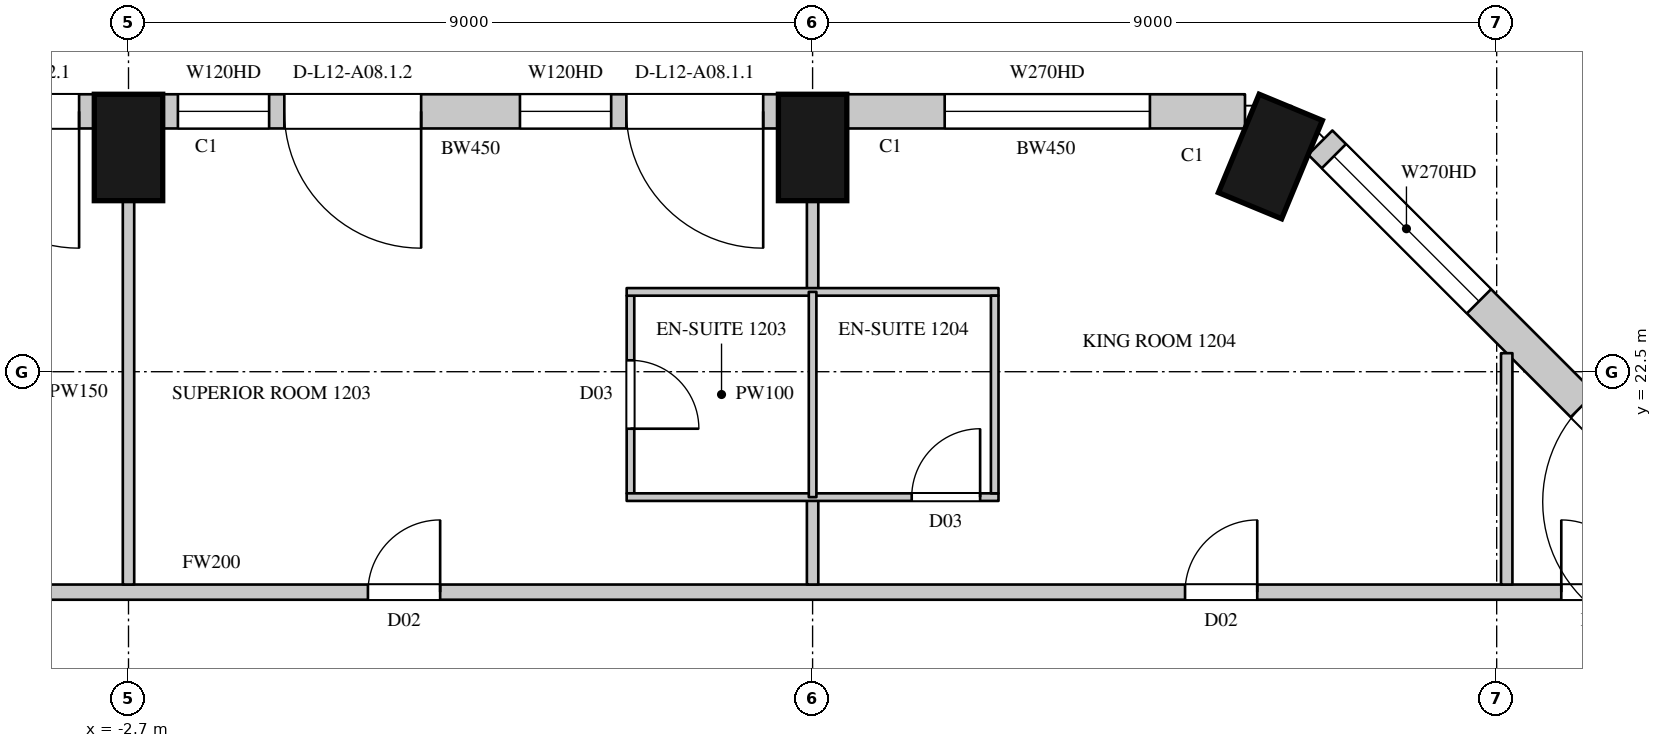
"""IFC4 building model, lengths in metres.
Left out: names, types, materials, properties, quantities, classifications, styles, units other than length and angle.
Written with IfcOpenShell. Run it as: python <this file> out.ifc"""

import sys

from ifc_helpers import new_model, si_unit, direction, frame, frame_2d, origin, origin_2d, place, context, subcontext, project, spatial, rectangle, extrude, element, fill, save


model = new_model("IFC4")
c1 = context("Model", 3, precision=1e-05, world=origin(), true_north=direction((0.0, 1.0)))
c2 = subcontext(c1, "Body", "Model", "MODEL_VIEW")
j1 = project(units=[si_unit("LENGTHUNIT", "METRE"), si_unit("PLANEANGLEUNIT", "RADIAN")], contexts=[c1])
p1 = place(None, origin())
s1 = spatial("IfcSite", under=j1, at=p1, CompositionType="ELEMENT")
p2 = place(p1, origin())
s2 = spatial("IfcBuilding", under=s1, at=p2, CompositionType="ELEMENT")
p3 = place(p2, frame((0.0, 0.0, 73.5)))
s3 = spatial("IfcBuildingStorey", under=s2, at=p3, CompositionType="ELEMENT", Elevation=73.5)
for number, where, z_axis, x_axis in (
    (1, (12.323, 25.331, 0.0), (0.0, 0.0, 1.0), (-0.924, 0.383, 0.0)),
    (2, (6.3, 25.45, 0.0), (0.0, 0.0, 1.0), (-1.0, 0.0, 0.0)),
    (3, (-2.7, 25.45, 0.0), (0.0, 0.0, 1.0), (-1.0, 0.0, 0.0)),
):
    element("IfcColumn", number, at=place(p3, frame(where, z_axis=z_axis, x_axis=x_axis)), inside=s3, PredefinedType="COLUMN", context=c2, shape_type="SweptSolid", body=[
        extrude(rectangle(XDim=0.9, YDim=1.4, at=origin_2d()), origin(), (0.0, 0.0, 1.0), 3.6),
    ])
p4 = place(p3, frame((18.229, 20.265, 0.0), z_axis=(0.0, 0.0, 1.0), x_axis=(-0.707106781187, 0.707106781187, 0.0)))
e4 = element("IfcWall", 4, at=p4, inside=s3, PredefinedType="SOLIDWALL", context=c2, shape_type="SweptSolid", body=[
    extrude(rectangle(XDim=7.424, YDim=0.45, at=frame_2d((3.712, 0.0))), origin(), (0.0, 0.0, 1.0), 3.3),
])
p5 = place(p4, frame((0.74, 0.0, 0.0)))
e5 = element("IfcOpeningElement", 5, at=p5, cuts=e4, PredefinedType="OPENING", context=c2, shape_type="SweptSolid", body=[
    extrude(rectangle(XDim=1.8, YDim=2.4, at=frame_2d((0.9, 1.2))), frame((0.0, 0.235, 0.0), z_axis=(0.0, -1.0, 0.0), x_axis=(1.0, 0.0, 0.0)), (0.0, 0.0, 1.0), 0.47),
])
p6 = place(p4, frame((4.471, 0.0, 1.05)))
e6 = element("IfcOpeningElement", 6, at=p6, cuts=e4, PredefinedType="OPENING", context=c2, shape_type="SweptSolid", body=[
    extrude(rectangle(XDim=2.7, YDim=2.0, at=frame_2d((1.35, 1.0))), frame((0.0, 0.235, 0.0), z_axis=(0.0, -1.0, 0.0), x_axis=(1.0, 0.0, 0.0)), (0.0, 0.0, 1.0), 0.47),
])
p7 = place(p3, frame((11.989, 25.925, 0.0), z_axis=(0.0, 0.0, 1.0), x_axis=(-1.0, 0.0, 0.0)))
e7 = element("IfcWall", 7, at=p7, inside=s3, PredefinedType="SOLIDWALL", context=c2, shape_type="SweptSolid", body=[
    extrude(rectangle(XDim=5.239, YDim=0.45, at=frame_2d((2.619, 0.0))), origin(), (0.0, 0.0, 1.0), 3.3),
])
p8 = place(p7, frame((1.251, 0.0, 1.05)))
e8 = element("IfcOpeningElement", 8, at=p8, cuts=e7, PredefinedType="OPENING", context=c2, shape_type="SweptSolid", body=[
    extrude(rectangle(XDim=2.7, YDim=2.0, at=frame_2d((1.35, 1.0))), frame((0.0, 0.235, 0.0), z_axis=(0.0, -1.0, 0.0), x_axis=(1.0, 0.0, 0.0)), (0.0, 0.0, 1.0), 0.47),
])
p9 = place(p3, frame((5.85, 25.925, 0.0), z_axis=(0.0, 0.0, 1.0), x_axis=(-1.0, 0.0, 0.0)))
e9 = element("IfcWall", 9, at=p9, inside=s3, PredefinedType="SOLIDWALL", context=c2, shape_type="SweptSolid", body=[
    extrude(rectangle(XDim=8.1, YDim=0.45, at=frame_2d((4.05, 0.0))), origin(), (0.0, 0.0, 1.0), 3.3),
])
p10 = place(p9, frame((0.2, 0.0, 0.0)))
e10 = element("IfcOpeningElement", 10, at=p10, cuts=e9, PredefinedType="OPENING", context=c2, shape_type="SweptSolid", body=[
    extrude(rectangle(XDim=1.8, YDim=2.4, at=frame_2d((0.9, 1.2))), frame((0.0, 0.235, 0.0), z_axis=(0.0, -1.0, 0.0), x_axis=(1.0, 0.0, 0.0)), (0.0, 0.0, 1.0), 0.47),
])
p11 = place(p9, frame((2.2, 0.0, 1.05)))
e11 = element("IfcOpeningElement", 11, at=p11, cuts=e9, PredefinedType="OPENING", context=c2, shape_type="SweptSolid", body=[
    extrude(rectangle(XDim=1.2, YDim=2.0, at=frame_2d((0.6, 1.0))), frame((0.0, 0.235, 0.0), z_axis=(0.0, -1.0, 0.0), x_axis=(1.0, 0.0, 0.0)), (0.0, 0.0, 1.0), 0.47),
])
p12 = place(p9, frame((4.7, 0.0, 0.0)))
e12 = element("IfcOpeningElement", 12, at=p12, cuts=e9, PredefinedType="OPENING", context=c2, shape_type="SweptSolid", body=[
    extrude(rectangle(XDim=1.8, YDim=2.4, at=frame_2d((0.9, 1.2))), frame((0.0, 0.235, 0.0), z_axis=(0.0, -1.0, 0.0), x_axis=(1.0, 0.0, 0.0)), (0.0, 0.0, 1.0), 0.47),
])
p13 = place(p9, frame((6.7, 0.0, 1.05)))
e13 = element("IfcOpeningElement", 13, at=p13, cuts=e9, PredefinedType="OPENING", context=c2, shape_type="SweptSolid", body=[
    extrude(rectangle(XDim=1.2, YDim=2.0, at=frame_2d((0.6, 1.0))), frame((0.0, 0.235, 0.0), z_axis=(0.0, -1.0, 0.0), x_axis=(1.0, 0.0, 0.0)), (0.0, 0.0, 1.0), 0.47),
])
p14 = place(p3, frame((-3.15, 25.925, 0.0), z_axis=(0.0, 0.0, 1.0), x_axis=(-1.0, 0.0, 0.0)))
e14 = element("IfcWall", 14, at=p14, inside=s3, PredefinedType="SOLIDWALL", context=c2, shape_type="SweptSolid", body=[
    extrude(rectangle(XDim=8.1, YDim=0.45, at=frame_2d((4.05, 0.0))), origin(), (0.0, 0.0, 1.0), 3.3),
])
p15 = place(p14, frame((0.2, 0.0, 0.0)))
e15 = element("IfcOpeningElement", 15, at=p15, cuts=e14, PredefinedType="OPENING", context=c2, shape_type="SweptSolid", body=[
    extrude(rectangle(XDim=1.8, YDim=2.4, at=frame_2d((0.9, 1.2))), frame((0.0, 0.235, 0.0), z_axis=(0.0, -1.0, 0.0), x_axis=(1.0, 0.0, 0.0)), (0.0, 0.0, 1.0), 0.47),
])
p16 = place(p14, frame((2.2, 0.0, 1.05)))
e16 = element("IfcOpeningElement", 16, at=p16, cuts=e14, PredefinedType="OPENING", context=c2, shape_type="SweptSolid", body=[
    extrude(rectangle(XDim=1.2, YDim=2.0, at=frame_2d((0.6, 1.0))), frame((0.0, 0.235, 0.0), z_axis=(0.0, -1.0, 0.0), x_axis=(1.0, 0.0, 0.0)), (0.0, 0.0, 1.0), 0.47),
])
p17 = place(p14, frame((4.7, 0.0, 0.0)))
e17 = element("IfcOpeningElement", 17, at=p17, cuts=e14, PredefinedType="OPENING", context=c2, shape_type="SweptSolid", body=[
    extrude(rectangle(XDim=1.8, YDim=2.4, at=frame_2d((0.9, 1.2))), frame((0.0, 0.235, 0.0), z_axis=(0.0, -1.0, 0.0), x_axis=(1.0, 0.0, 0.0)), (0.0, 0.0, 1.0), 0.47),
])
p18 = place(p14, frame((6.7, 0.0, 1.05)))
e18 = element("IfcOpeningElement", 18, at=p18, cuts=e14, PredefinedType="OPENING", context=c2, shape_type="SweptSolid", body=[
    extrude(rectangle(XDim=1.2, YDim=2.0, at=frame_2d((0.6, 1.0))), frame((0.0, 0.235, 0.0), z_axis=(0.0, -1.0, 0.0), x_axis=(1.0, 0.0, 0.0)), (0.0, 0.0, 1.0), 0.47),
])
p19 = place(p3, frame((16.486, 23.529, 0.0), z_axis=(0.0, 0.0, 1.0), x_axis=(-0.707022305137, 0.707191247145, 0.0)))
e19 = element("IfcWall", 19, at=p19, inside=s3, PredefinedType="SOLIDWALL", context=c2, shape_type="SweptSolid", body=[
    extrude(rectangle(XDim=1.445, YDim=0.45, at=frame_2d((0.723, 0.0))), origin(), (0.0, 0.0, 1.0), 0.6),
])
p20 = place(p3, frame((-20.7, 19.6, 0.0), z_axis=(0.0, 0.0, 1.0), x_axis=(1.0, 0.0, 0.0)))
e20 = element("IfcWall", 20, at=p20, inside=s3, PredefinedType="PARTITIONING", context=c2, shape_type="SweptSolid", body=[
    extrude(rectangle(XDim=38.184, YDim=0.2, at=frame_2d((19.092, 0.0))), origin(), (0.0, 0.0, 1.0), 3.3),
])
p21 = place(p20, frame((3.15, 0.0, 0.0)))
e21 = element("IfcOpeningElement", 21, at=p21, cuts=e20, PredefinedType="OPENING", context=c2, shape_type="SweptSolid", body=[
    extrude(rectangle(XDim=0.95, YDim=2.2, at=frame_2d((0.475, 1.1))), frame((0.0, 0.11, 0.0), z_axis=(0.0, -1.0, 0.0), x_axis=(1.0, 0.0, 0.0)), (0.0, 0.0, 1.0), 0.22),
])
p22 = place(p20, frame((13.9, 0.0, 0.0)))
e22 = element("IfcOpeningElement", 22, at=p22, cuts=e20, PredefinedType="OPENING", context=c2, shape_type="SweptSolid", body=[
    extrude(rectangle(XDim=0.95, YDim=2.2, at=frame_2d((0.475, 1.1))), frame((0.0, 0.11, 0.0), z_axis=(0.0, -1.0, 0.0), x_axis=(1.0, 0.0, 0.0)), (0.0, 0.0, 1.0), 0.22),
])
p23 = place(p20, frame((21.15, 0.0, 0.0)))
e23 = element("IfcOpeningElement", 23, at=p23, cuts=e20, PredefinedType="OPENING", context=c2, shape_type="SweptSolid", body=[
    extrude(rectangle(XDim=0.95, YDim=2.2, at=frame_2d((0.475, 1.1))), frame((0.0, 0.11, 0.0), z_axis=(0.0, -1.0, 0.0), x_axis=(1.0, 0.0, 0.0)), (0.0, 0.0, 1.0), 0.22),
])
p24 = place(p20, frame((31.9, 0.0, 0.0)))
e24 = element("IfcOpeningElement", 24, at=p24, cuts=e20, PredefinedType="OPENING", context=c2, shape_type="SweptSolid", body=[
    extrude(rectangle(XDim=0.95, YDim=2.2, at=frame_2d((0.475, 1.1))), frame((0.0, 0.11, 0.0), z_axis=(0.0, -1.0, 0.0), x_axis=(1.0, 0.0, 0.0)), (0.0, 0.0, 1.0), 0.22),
])
p25 = place(p20, frame((36.85, 0.0, 0.0)))
e25 = element("IfcOpeningElement", 25, at=p25, cuts=e20, PredefinedType="OPENING", context=c2, shape_type="SweptSolid", body=[
    extrude(rectangle(XDim=0.95, YDim=2.2, at=frame_2d((0.475, 1.1))), frame((0.0, 0.11, 0.0), z_axis=(0.0, -1.0, 0.0), x_axis=(1.0, 0.0, 0.0)), (0.0, 0.0, 1.0), 0.22),
])
p26 = place(p3, frame((-2.7, 19.7, 0.0), z_axis=(0.0, 0.0, 1.0), x_axis=(0.0, 1.0, 0.0)))
e26 = element("IfcWall", 26, at=p26, inside=s3, PredefinedType="PARTITIONING", context=c2, shape_type="SweptSolid", body=[
    extrude(rectangle(XDim=5.05, YDim=0.15, at=frame_2d((2.525, 0.0))), origin(), (0.0, 0.0, 1.0), 2.75),
])
p27 = place(p3, frame((6.3, 19.7, 0.0), z_axis=(0.0, 0.0, 1.0), x_axis=(0.0, 1.0, 0.0)))
e27 = element("IfcWall", 27, at=p27, inside=s3, PredefinedType="PARTITIONING", context=c2, shape_type="SweptSolid", body=[
    extrude(rectangle(XDim=1.15, YDim=0.15, at=frame_2d((0.575, 0.0))), origin(), (0.0, 0.0, 1.0), 2.75),
])
p28 = place(p3, frame((6.3, 23.55, 0.0), z_axis=(0.0, 0.0, 1.0), x_axis=(0.0, 1.0, 0.0)))
e28 = element("IfcWall", 28, at=p28, inside=s3, PredefinedType="PARTITIONING", context=c2, shape_type="SweptSolid", body=[
    extrude(rectangle(XDim=1.2, YDim=0.15, at=frame_2d((0.6, 0.0))), origin(), (0.0, 0.0, 1.0), 2.75),
])
p29 = place(p3, frame((15.432, 19.7, 0.0), z_axis=(0.0, 0.0, 1.0), x_axis=(0.0, 1.0, 0.0)))
e29 = element("IfcWall", 29, at=p29, inside=s3, PredefinedType="PARTITIONING", context=c2, shape_type="SweptSolid", body=[
    extrude(rectangle(XDim=3.044, YDim=0.15, at=frame_2d((1.522, 0.0))), origin(), (0.0, 0.0, 1.0), 3.3),
])
p30 = place(p3, frame((3.904, 20.9, 0.0), z_axis=(0.0, 0.0, 1.0), x_axis=(0.0, 1.0, 0.0)))
e30 = element("IfcWall", 30, at=p30, inside=s3, PredefinedType="PARTITIONING", context=c2, shape_type="SweptSolid", body=[
    extrude(rectangle(XDim=2.6, YDim=0.1, at=frame_2d((1.3, 0.0))), origin(), (0.0, 0.0, 1.0), 3.3),
])
p31 = place(p30, frame((0.85, 0.0, 0.0)))
e31 = element("IfcOpeningElement", 31, at=p31, cuts=e30, PredefinedType="OPENING", context=c2, shape_type="SweptSolid", body=[
    extrude(rectangle(XDim=0.9, YDim=2.2, at=frame_2d((0.45, 1.1))), frame((0.0, 0.06, 0.0), z_axis=(0.0, -1.0, 0.0), x_axis=(1.0, 0.0, 0.0)), (0.0, 0.0, 1.0), 0.12),
])
p32 = place(p3, frame((3.854, 20.85, 0.0), z_axis=(0.0, 0.0, 1.0), x_axis=(1.0, 0.0, 0.0)))
e32 = element("IfcWall", 32, at=p32, inside=s3, PredefinedType="PARTITIONING", context=c2, shape_type="SweptSolid", body=[
    extrude(rectangle(XDim=4.892, YDim=0.1, at=frame_2d((2.446, 0.0))), origin(), (0.0, 0.0, 1.0), 3.3),
])
p33 = place(p32, frame((3.75, 0.0, 0.0)))
e33 = element("IfcOpeningElement", 33, at=p33, cuts=e32, PredefinedType="OPENING", context=c2, shape_type="SweptSolid", body=[
    extrude(rectangle(XDim=0.9, YDim=2.2, at=frame_2d((0.45, 1.1))), frame((0.0, 0.06, 0.0), z_axis=(0.0, -1.0, 0.0), x_axis=(1.0, 0.0, 0.0)), (0.0, 0.0, 1.0), 0.12),
])
p34 = place(p3, frame((3.854, 23.55, 0.0), z_axis=(0.0, 0.0, 1.0), x_axis=(1.0, 0.0, 0.0)))
e34 = element("IfcWall", 34, at=p34, inside=s3, PredefinedType="PARTITIONING", context=c2, shape_type="SweptSolid", body=[
    extrude(rectangle(XDim=4.892, YDim=0.1, at=frame_2d((2.446, 0.0))), origin(), (0.0, 0.0, 1.0), 3.3),
])
p35 = place(p3, frame((6.3, 20.85, 0.0), z_axis=(0.0, 0.0, 1.0), x_axis=(0.0, 1.0, 0.0)))
e35 = element("IfcWall", 35, at=p35, inside=s3, PredefinedType="PARTITIONING", context=c2, shape_type="SweptSolid", body=[
    extrude(rectangle(XDim=2.7, YDim=0.1, at=frame_2d((1.35, 0.0))), origin(), (0.0, 0.0, 1.0), 2.75),
])
p36 = place(p3, frame((8.696, 20.9, 0.0), z_axis=(0.0, 0.0, 1.0), x_axis=(0.0, 1.0, 0.0)))
e36 = element("IfcWall", 36, at=p36, inside=s3, PredefinedType="PARTITIONING", context=c2, shape_type="SweptSolid", body=[
    extrude(rectangle(XDim=2.6, YDim=0.1, at=frame_2d((1.3, 0.0))), origin(), (0.0, 0.0, 1.0), 3.3),
])
p37 = place(p5, origin())
e37 = element("IfcDoor", 37, at=p37, inside=s3, OperationType="SLIDING_TO_LEFT", PredefinedType="DOOR", context=c2, shape_type="SweptSolid", body=[
    extrude(rectangle(XDim=1.8, YDim=2.4, at=frame_2d((0.9, 1.2))), frame((0.0, 0.13, 0.0), z_axis=(0.0, -1.0, 0.0), x_axis=(1.0, 0.0, 0.0)), (0.0, 0.0, 1.0), 0.05),
])
fill(e5, e37)
p38 = place(p6, origin())
e38 = element("IfcWindow", 38, at=p38, inside=s3, PartitioningType="SINGLE_PANEL", PredefinedType="WINDOW", context=c2, shape_type="SweptSolid", body=[
    extrude(rectangle(XDim=2.7, YDim=2.0, at=frame_2d((1.35, 1.0))), frame((0.0, 0.135, 0.0), z_axis=(0.0, -1.0, 0.0), x_axis=(1.0, 0.0, 0.0)), (0.0, 0.0, 1.0), 0.06),
])
fill(e6, e38)
p39 = place(p8, origin())
e39 = element("IfcWindow", 39, at=p39, inside=s3, PartitioningType="SINGLE_PANEL", PredefinedType="WINDOW", context=c2, shape_type="SweptSolid", body=[
    extrude(rectangle(XDim=2.7, YDim=2.0, at=frame_2d((1.35, 1.0))), frame((0.0, 0.135, 0.0), z_axis=(0.0, -1.0, 0.0), x_axis=(1.0, 0.0, 0.0)), (0.0, 0.0, 1.0), 0.06),
])
fill(e8, e39)
p40 = place(p10, origin())
e40 = element("IfcDoor", 40, at=p40, inside=s3, OperationType="SLIDING_TO_LEFT", PredefinedType="DOOR", context=c2, shape_type="SweptSolid", body=[
    extrude(rectangle(XDim=1.8, YDim=2.4, at=frame_2d((0.9, 1.2))), frame((0.0, 0.13, 0.0), z_axis=(0.0, -1.0, 0.0), x_axis=(1.0, 0.0, 0.0)), (0.0, 0.0, 1.0), 0.05),
])
fill(e10, e40)
p41 = place(p11, origin())
e41 = element("IfcWindow", 41, at=p41, inside=s3, PartitioningType="SINGLE_PANEL", PredefinedType="WINDOW", context=c2, shape_type="SweptSolid", body=[
    extrude(rectangle(XDim=1.2, YDim=2.0, at=frame_2d((0.6, 1.0))), frame((0.0, 0.135, 0.0), z_axis=(0.0, -1.0, 0.0), x_axis=(1.0, 0.0, 0.0)), (0.0, 0.0, 1.0), 0.06),
])
fill(e11, e41)
p42 = place(p12, origin())
e42 = element("IfcDoor", 42, at=p42, inside=s3, OperationType="SLIDING_TO_LEFT", PredefinedType="DOOR", context=c2, shape_type="SweptSolid", body=[
    extrude(rectangle(XDim=1.8, YDim=2.4, at=frame_2d((0.9, 1.2))), frame((0.0, 0.13, 0.0), z_axis=(0.0, -1.0, 0.0), x_axis=(1.0, 0.0, 0.0)), (0.0, 0.0, 1.0), 0.05),
])
fill(e12, e42)
p43 = place(p13, origin())
e43 = element("IfcWindow", 43, at=p43, inside=s3, PartitioningType="SINGLE_PANEL", PredefinedType="WINDOW", context=c2, shape_type="SweptSolid", body=[
    extrude(rectangle(XDim=1.2, YDim=2.0, at=frame_2d((0.6, 1.0))), frame((0.0, 0.135, 0.0), z_axis=(0.0, -1.0, 0.0), x_axis=(1.0, 0.0, 0.0)), (0.0, 0.0, 1.0), 0.06),
])
fill(e13, e43)
p44 = place(p15, origin())
e44 = element("IfcDoor", 44, at=p44, inside=s3, OperationType="SLIDING_TO_LEFT", PredefinedType="DOOR", context=c2, shape_type="SweptSolid", body=[
    extrude(rectangle(XDim=1.8, YDim=2.4, at=frame_2d((0.9, 1.2))), frame((0.0, 0.13, 0.0), z_axis=(0.0, -1.0, 0.0), x_axis=(1.0, 0.0, 0.0)), (0.0, 0.0, 1.0), 0.05),
])
fill(e15, e44)
p45 = place(p23, origin())
e45 = element("IfcDoor", 45, at=p45, inside=s3, OperationType="SINGLE_SWING_RIGHT", PredefinedType="DOOR", context=c2, shape_type="SweptSolid", body=[
    extrude(rectangle(XDim=0.95, YDim=2.2, at=frame_2d((0.475, 1.1))), frame((0.0, 0.025, 0.0), z_axis=(0.0, -1.0, 0.0), x_axis=(1.0, 0.0, 0.0)), (0.0, 0.0, 1.0), 0.05),
])
fill(e23, e45)
p46 = place(p31, origin())
e46 = element("IfcDoor", 46, at=p46, inside=s3, OperationType="SINGLE_SWING_RIGHT", PredefinedType="DOOR", context=c2, shape_type="SweptSolid", body=[
    extrude(rectangle(XDim=0.9, YDim=2.2, at=frame_2d((0.45, 1.1))), frame((0.0, 0.025, 0.0), z_axis=(0.0, -1.0, 0.0), x_axis=(1.0, 0.0, 0.0)), (0.0, 0.0, 1.0), 0.05),
])
fill(e31, e46)
p47 = place(p24, origin())
e47 = element("IfcDoor", 47, at=p47, inside=s3, OperationType="SINGLE_SWING_RIGHT", PredefinedType="DOOR", context=c2, shape_type="SweptSolid", body=[
    extrude(rectangle(XDim=0.95, YDim=2.2, at=frame_2d((0.475, 1.1))), frame((0.0, 0.025, 0.0), z_axis=(0.0, -1.0, 0.0), x_axis=(1.0, 0.0, 0.0)), (0.0, 0.0, 1.0), 0.05),
])
fill(e24, e47)
p48 = place(p33, origin())
e48 = element("IfcDoor", 48, at=p48, inside=s3, OperationType="SINGLE_SWING_RIGHT", PredefinedType="DOOR", context=c2, shape_type="SweptSolid", body=[
    extrude(rectangle(XDim=0.9, YDim=2.2, at=frame_2d((0.45, 1.1))), frame((0.0, 0.025, 0.0), z_axis=(0.0, -1.0, 0.0), x_axis=(1.0, 0.0, 0.0)), (0.0, 0.0, 1.0), 0.05),
])
fill(e33, e48)
p49 = place(p25, origin())
e49 = element("IfcDoor", 49, at=p49, inside=s3, OperationType="SINGLE_SWING_LEFT", PredefinedType="DOOR", context=c2, shape_type="SweptSolid", body=[
    extrude(rectangle(XDim=0.95, YDim=2.2, at=frame_2d((0.475, 1.1))), frame((0.0, 0.025, 0.0), z_axis=(0.0, -1.0, 0.0), x_axis=(1.0, 0.0, 0.0)), (0.0, 0.0, 1.0), 0.05),
])
fill(e25, e49)
save(model, sys.argv[1])
